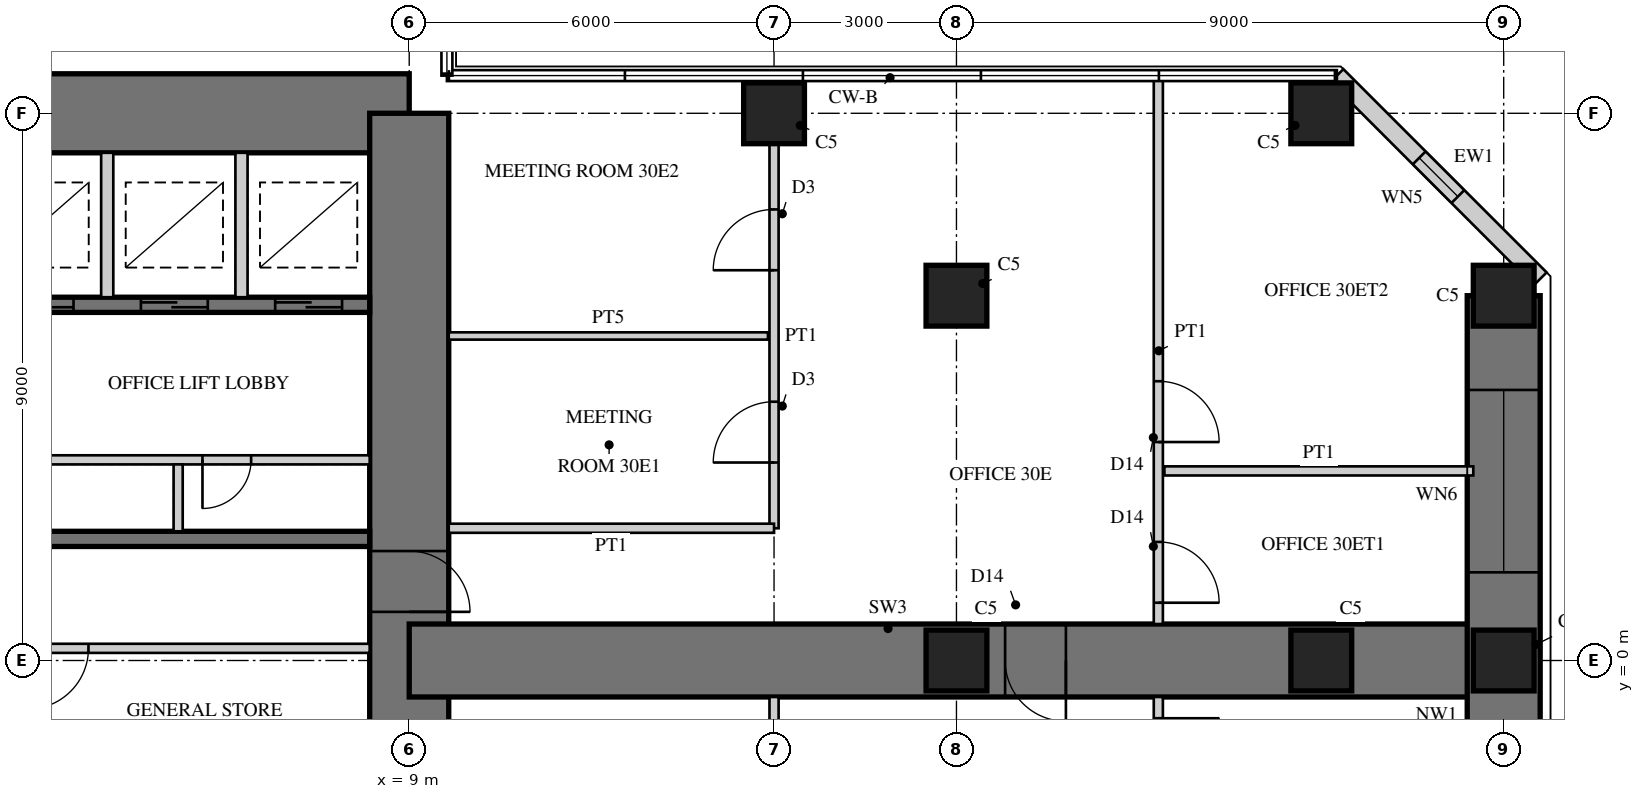
"""IFC4 building model, lengths in metres.
Left out: names, types, materials, properties, quantities, classifications, styles, units other than length and angle.
Written with IfcOpenShell. Run it as: python <this file> out.ifc"""

import sys

from ifc_helpers import new_model, si_unit, direction, frame, frame_2d, origin, origin_2d, place, context, subcontext, project, spatial, rectangle, hollow_rectangle, extrude, element, fill, save


model = new_model("IFC4")
c1 = context("Model", 3, precision=1e-05, world=origin(), true_north=direction((0.0, 1.0)))
c2 = subcontext(c1, "Body", "Model", "MODEL_VIEW")
j1 = project(units=[si_unit("LENGTHUNIT", "METRE"), si_unit("PLANEANGLEUNIT", "RADIAN")], contexts=[c1])
p1 = place(None, origin())
s1 = spatial("IfcSite", under=j1, at=p1, CompositionType="ELEMENT")
p2 = place(p1, origin())
s2 = spatial("IfcBuilding", under=s1, at=p2, CompositionType="ELEMENT")
p3 = place(p2, frame((0.0, 0.0, 124.5)))
s3 = spatial("IfcBuildingStorey", under=s2, at=p3, CompositionType="ELEMENT", Elevation=124.5)
p4 = place(p3, frame((9.0, 9.0, 0.0), z_axis=(0.0, 0.0, 1.0), x_axis=(-1.0, 0.0, 0.0)))
e1 = element("IfcWall", 1, at=p4, inside=s3, PredefinedType="SHEAR", context=c2, shape_type="SweptSolid", body=[
    extrude(rectangle(XDim=18.0, YDim=1.3, at=frame_2d((9.0, 0.0))), origin(), (0.0, 0.0, 1.0), 4.0),
])
p5 = place(p4, frame((9.8, 0.0, 0.0)))
e2 = element("IfcOpeningElement", 2, at=p5, cuts=e1, PredefinedType="OPENING", context=c2, shape_type="SweptSolid", body=[
    extrude(rectangle(XDim=1.0, YDim=2.4, at=frame_2d((0.5, 1.2))), frame((0.0, 0.66, 0.0), z_axis=(0.0, -1.0, 0.0), x_axis=(1.0, 0.0, 0.0)), (0.0, 0.0, 1.0), 1.32),
])
p6 = place(p3, frame((9.0, -9.0, 0.0), z_axis=(0.0, 0.0, 1.0), x_axis=(0.0, 1.0, 0.0)))
e3 = element("IfcWall", 3, at=p6, inside=s3, PredefinedType="SHEAR", context=c2, shape_type="SweptSolid", body=[
    extrude(rectangle(XDim=18.0, YDim=1.3, at=frame_2d((9.0, 0.0))), origin(), (0.0, 0.0, 1.0), 4.0),
])
p7 = place(p6, frame((9.8, 0.0, 0.0)))
e4 = element("IfcOpeningElement", 4, at=p7, cuts=e3, PredefinedType="OPENING", context=c2, shape_type="SweptSolid", body=[
    extrude(rectangle(XDim=1.0, YDim=2.4, at=frame_2d((0.5, 1.2))), frame((0.0, 0.66, 0.0), z_axis=(0.0, -1.0, 0.0), x_axis=(1.0, 0.0, 0.0)), (0.0, 0.0, 1.0), 1.32),
])
p8 = place(p3, frame((1.925, 2.0, 0.0), z_axis=(0.0, 0.0, 1.0), x_axis=(1.0, 0.0, 0.0)))
e5 = element("IfcWall", 5, at=p8, inside=s3, PredefinedType="SHEAR", context=c2, shape_type="SweptSolid", body=[
    extrude(rectangle(XDim=6.425, YDim=0.25, at=frame_2d((3.212, 0.0))), origin(), (0.0, 0.0, 1.0), 4.0),
])
p9 = place(p3, frame((1.925, 5.85, 0.0), z_axis=(0.0, 0.0, 1.0), x_axis=(1.0, 0.0, 0.0)))
e6 = element("IfcWall", 6, at=p9, inside=s3, PredefinedType="SHEAR", context=c2, shape_type="SweptSolid", body=[
    extrude(rectangle(XDim=6.425, YDim=0.25, at=frame_2d((3.212, 0.0))), origin(), (0.0, 0.0, 1.0), 4.0),
])
p10 = place(p9, frame((0.454, 0.0, 0.0)))
e7 = element("IfcOpeningElement", 7, at=p10, cuts=e6, PredefinedType="OPENING", context=c2, shape_type="SweptSolid", body=[
    extrude(rectangle(XDim=1.1, YDim=2.2, at=frame_2d((0.55, 1.1))), frame((0.0, 0.135, 0.0), z_axis=(0.0, -1.0, 0.0), x_axis=(1.0, 0.0, 0.0)), (0.0, 0.0, 1.0), 0.27),
])
p11 = place(p9, frame((2.663, 0.0, 0.0)))
e8 = element("IfcOpeningElement", 8, at=p11, cuts=e6, PredefinedType="OPENING", context=c2, shape_type="SweptSolid", body=[
    extrude(rectangle(XDim=1.1, YDim=2.2, at=frame_2d((0.55, 1.1))), frame((0.0, 0.135, 0.0), z_axis=(0.0, -1.0, 0.0), x_axis=(1.0, 0.0, 0.0)), (0.0, 0.0, 1.0), 0.27),
])
p12 = place(p9, frame((4.871, 0.0, 0.0)))
e9 = element("IfcOpeningElement", 9, at=p12, cuts=e6, PredefinedType="OPENING", context=c2, shape_type="SweptSolid", body=[
    extrude(rectangle(XDim=1.1, YDim=2.2, at=frame_2d((0.55, 1.1))), frame((0.0, 0.135, 0.0), z_axis=(0.0, -1.0, 0.0), x_axis=(1.0, 0.0, 0.0)), (0.0, 0.0, 1.0), 0.27),
])
p13 = place(p3, frame((1.925, 3.3, 0.0), z_axis=(0.0, 0.0, 1.0), x_axis=(1.0, 0.0, 0.0)))
e10 = element("IfcWall", 10, at=p13, inside=s3, PredefinedType="PARTITIONING", context=c2, shape_type="SweptSolid", body=[
    extrude(rectangle(XDim=6.425, YDim=0.15, at=frame_2d((3.212, 0.0))), origin(), (0.0, 0.0, 1.0), 4.0),
])
p14 = place(p13, frame((0.075, 0.0, 0.0)))
e11 = element("IfcOpeningElement", 11, at=p14, cuts=e10, PredefinedType="OPENING", context=c2, shape_type="SweptSolid", body=[
    extrude(rectangle(XDim=0.8, YDim=2.1, at=frame_2d((0.4, 1.05))), frame((0.0, 0.085, 0.0), z_axis=(0.0, -1.0, 0.0), x_axis=(1.0, 0.0, 0.0)), (0.0, 0.0, 1.0), 0.17),
])
p15 = place(p13, frame((3.675, 0.0, 0.0)))
e12 = element("IfcOpeningElement", 12, at=p15, cuts=e10, PredefinedType="OPENING", context=c2, shape_type="SweptSolid", body=[
    extrude(rectangle(XDim=0.8, YDim=2.1, at=frame_2d((0.4, 1.05))), frame((0.0, 0.085, 0.0), z_axis=(0.0, -1.0, 0.0), x_axis=(1.0, 0.0, 0.0)), (0.0, 0.0, 1.0), 0.17),
])
p16 = place(p3, frame((5.2, 2.125, 0.0), z_axis=(0.0, 0.0, 1.0), x_axis=(0.0, 1.0, 0.0)))
e13 = element("IfcWall", 13, at=p16, inside=s3, PredefinedType="PARTITIONING", context=c2, shape_type="SweptSolid", body=[
    extrude(rectangle(XDim=1.1, YDim=0.15, at=frame_2d((0.55, 0.0))), origin(), (0.0, 0.0, 1.0), 4.0),
])
for number, where, z_axis, x_axis in (
    (14, (4.033, 5.975, 0.0), (0.0, 0.0, 1.0), (0.0, 1.0, 0.0)),
    (15, (6.242, 5.975, 0.0), (0.0, 0.0, 1.0), (0.0, 1.0, 0.0)),
):
    element("IfcWall", number, at=place(p3, frame(where, z_axis=z_axis, x_axis=x_axis)), inside=s3, PredefinedType="PARTITIONING", context=c2, shape_type="SweptSolid", body=[
        extrude(rectangle(XDim=2.375, YDim=0.2, at=frame_2d((1.188, 0.0))), origin(), (0.0, 0.0, 1.0), 4.0),
    ])
p17 = place(p3, frame((9.0, 0.0, 0.0), z_axis=(0.0, 0.0, 1.0), x_axis=(1.0, 0.0, 0.0)))
e16 = element("IfcWall", 16, at=p17, inside=s3, PredefinedType="SHEAR", context=c2, shape_type="SweptSolid", body=[
    extrude(rectangle(XDim=18.0, YDim=1.2, at=frame_2d((9.0, 0.0))), origin(), (0.0, 0.0, 1.0), 4.0),
])
p18 = place(p17, frame((9.8, 0.0, 0.0)))
e17 = element("IfcOpeningElement", 17, at=p18, cuts=e16, PredefinedType="OPENING", context=c2, shape_type="SweptSolid", body=[
    extrude(rectangle(XDim=1.0, YDim=2.2, at=frame_2d((0.5, 1.1))), frame((0.0, 0.61, 0.0), z_axis=(0.0, -1.0, 0.0), x_axis=(1.0, 0.0, 0.0)), (0.0, 0.0, 1.0), 1.22),
])
p19 = place(p3, frame((27.0, -6.0, 0.0), z_axis=(0.0, 0.0, 1.0), x_axis=(0.0, 1.0, 0.0)))
e18 = element("IfcWall", 18, at=p19, inside=s3, PredefinedType="SHEAR", context=c2, shape_type="SweptSolid", body=[
    extrude(rectangle(XDim=12.0, YDim=1.2, at=frame_2d((6.0, 0.0))), origin(), (0.0, 0.0, 1.0), 4.0),
])
p20 = place(p19, frame((1.55, 0.0, 0.6)))
e19 = element("IfcOpeningElement", 19, at=p20, cuts=e18, PredefinedType="OPENING", context=c2, shape_type="SweptSolid", body=[
    extrude(rectangle(XDim=3.0, YDim=2.4, at=frame_2d((1.5, 1.2))), frame((0.0, 0.61, 0.0), z_axis=(0.0, -1.0, 0.0), x_axis=(1.0, 0.0, 0.0)), (0.0, 0.0, 1.0), 1.22),
])
p21 = place(p19, frame((7.45, 0.0, 0.6)))
e20 = element("IfcOpeningElement", 20, at=p21, cuts=e18, PredefinedType="OPENING", context=c2, shape_type="SweptSolid", body=[
    extrude(rectangle(XDim=3.0, YDim=2.4, at=frame_2d((1.5, 1.2))), frame((0.0, 0.61, 0.0), z_axis=(0.0, -1.0, 0.0), x_axis=(1.0, 0.0, 0.0)), (0.0, 0.0, 1.0), 1.22),
])
for number, where, z_axis, x_axis in (
    (21, (15.0, 9.0, 0.0), (0.0, 0.0, 1.0), (1.0, 0.0, 0.0)),
    (22, (24.0, 9.0, 0.0), (0.0, 0.0, 1.0), (1.0, 0.0, 0.0)),
    (23, (27.0, 0.0, 0.0), (0.0, 0.0, 1.0), (1.0, 0.0, 0.0)),
    (24, (27.0, 6.0, 0.0), (0.0, 0.0, 1.0), (1.0, 0.0, 0.0)),
    (25, (18.0, 0.0, 0.0), (0.0, 0.0, 1.0), (1.0, 0.0, 0.0)),
    (26, (18.0, 6.0, 0.0), (0.0, 0.0, 1.0), (1.0, 0.0, 0.0)),
    (27, (24.0, 0.0, 0.0), (0.0, 0.0, 1.0), (1.0, 0.0, 0.0)),
):
    element("IfcColumn", number, at=place(p3, frame(where, z_axis=z_axis, x_axis=x_axis)), inside=s3, PredefinedType="COLUMN", context=c2, shape_type="SweptSolid", body=[
        extrude(rectangle(XDim=1.0, YDim=1.0, at=origin_2d()), origin(), (0.0, 0.0, 1.0), 4.0),
    ])
p22 = place(p3, frame((27.6, 6.277, 0.0), z_axis=(0.0, 0.0, 1.0), x_axis=(-0.707106781187, 0.707106781187, 0.0)))
e28 = element("IfcWall", 28, at=p22, inside=s3, PredefinedType="SOLIDWALL", context=c2, shape_type="SweptSolid", body=[
    extrude(rectangle(XDim=4.728, YDim=0.3, at=frame_2d((2.364, 0.0))), origin(), (0.0, 0.0, 1.0), 3.8),
])
p23 = place(p22, frame((1.914, 0.0, 0.3)))
e29 = element("IfcOpeningElement", 29, at=p23, cuts=e28, PredefinedType="OPENING", context=c2, shape_type="SweptSolid", body=[
    extrude(rectangle(XDim=0.9, YDim=2.4, at=frame_2d((0.45, 1.2))), frame((0.0, 0.16, 0.0), z_axis=(0.0, -1.0, 0.0), x_axis=(1.0, 0.0, 0.0)), (0.0, 0.0, 1.0), 0.32),
])
p24 = place(p3, frame((2.325, 0.2, 0.0), z_axis=(0.0, 0.0, 1.0), x_axis=(1.0, 0.0, 0.0)))
e30 = element("IfcWall", 30, at=p24, inside=s3, PredefinedType="PARTITIONING", context=c2, shape_type="SweptSolid", body=[
    extrude(rectangle(XDim=6.025, YDim=0.15, at=frame_2d((3.013, 0.0))), origin(), (0.0, 0.0, 1.0), 3.8),
])
p25 = place(p24, frame((0.4, 0.0, 0.0)))
e31 = element("IfcOpeningElement", 31, at=p25, cuts=e30, PredefinedType="OPENING", context=c2, shape_type="SweptSolid", body=[
    extrude(rectangle(XDim=1.0, YDim=2.1, at=frame_2d((0.5, 1.05))), frame((0.0, 0.085, 0.0), z_axis=(0.0, -1.0, 0.0), x_axis=(1.0, 0.0, 0.0)), (0.0, 0.0, 1.0), 0.17),
])
p26 = place(p3, frame((15.0, 2.175, 0.0), z_axis=(0.0, 0.0, 1.0), x_axis=(0.0, 1.0, 0.0)))
e32 = element("IfcWall", 32, at=p26, inside=s3, PredefinedType="PARTITIONING", context=c2, shape_type="SweptSolid", body=[
    extrude(rectangle(XDim=6.325, YDim=0.15, at=frame_2d((3.163, 0.0))), origin(), (0.0, 0.0, 1.0), 3.0),
])
p27 = place(p26, frame((1.081, 0.0, 0.0)))
e33 = element("IfcOpeningElement", 33, at=p27, cuts=e32, PredefinedType="OPENING", context=c2, shape_type="SweptSolid", body=[
    extrude(rectangle(XDim=1.0, YDim=2.1, at=frame_2d((0.5, 1.05))), frame((0.0, 0.085, 0.0), z_axis=(0.0, -1.0, 0.0), x_axis=(1.0, 0.0, 0.0)), (0.0, 0.0, 1.0), 0.17),
])
p28 = place(p26, frame((4.244, 0.0, 0.0)))
e34 = element("IfcOpeningElement", 34, at=p28, cuts=e32, PredefinedType="OPENING", context=c2, shape_type="SweptSolid", body=[
    extrude(rectangle(XDim=1.0, YDim=2.1, at=frame_2d((0.5, 1.05))), frame((0.0, 0.085, 0.0), z_axis=(0.0, -1.0, 0.0), x_axis=(1.0, 0.0, 0.0)), (0.0, 0.0, 1.0), 0.17),
])
p29 = place(p3, frame((9.65, 2.175, 0.0), z_axis=(0.0, 0.0, 1.0), x_axis=(1.0, 0.0, 0.0)))
e35 = element("IfcWall", 35, at=p29, inside=s3, PredefinedType="PARTITIONING", context=c2, shape_type="SweptSolid", body=[
    extrude(rectangle(XDim=5.35, YDim=0.15, at=frame_2d((2.675, 0.0))), origin(), (0.0, 0.0, 1.0), 3.8),
])
p30 = place(p3, frame((9.65, 5.337, 0.0), z_axis=(0.0, 0.0, 1.0), x_axis=(1.0, 0.0, 0.0)))
e36 = element("IfcWall", 36, at=p30, inside=s3, PredefinedType="PLUMBINGWALL", context=c2, shape_type="SweptSolid", body=[
    extrude(rectangle(XDim=5.25, YDim=0.12, at=frame_2d((2.625, 0.0))), origin(), (0.0, 0.0, 1.0), 3.8),
])
p31 = place(p3, frame((15.0, -8.5, 0.0), z_axis=(0.0, 0.0, 1.0), x_axis=(0.0, 1.0, 0.0)))
e37 = element("IfcWall", 37, at=p31, inside=s3, PredefinedType="PARTITIONING", context=c2, shape_type="SweptSolid", body=[
    extrude(rectangle(XDim=7.9, YDim=0.15, at=frame_2d((3.95, 0.0))), origin(), (0.0, 0.0, 1.0), 3.0),
])
p32 = place(p31, frame((0.8, 0.0, 0.0)))
e38 = element("IfcOpeningElement", 38, at=p32, cuts=e37, PredefinedType="OPENING", context=c2, shape_type="SweptSolid", body=[
    extrude(rectangle(XDim=1.0, YDim=2.1, at=frame_2d((0.5, 1.05))), frame((0.0, 0.085, 0.0), z_axis=(0.0, -1.0, 0.0), x_axis=(1.0, 0.0, 0.0)), (0.0, 0.0, 1.0), 0.17),
])
p33 = place(p31, frame((3.4, 0.0, 0.0)))
e39 = element("IfcOpeningElement", 39, at=p33, cuts=e37, PredefinedType="OPENING", context=c2, shape_type="SweptSolid", body=[
    extrude(rectangle(XDim=1.0, YDim=2.1, at=frame_2d((0.5, 1.05))), frame((0.0, 0.085, 0.0), z_axis=(0.0, -1.0, 0.0), x_axis=(1.0, 0.0, 0.0)), (0.0, 0.0, 1.0), 0.17),
])
p34 = place(p31, frame((6.05, 0.0, 0.0)))
e40 = element("IfcOpeningElement", 40, at=p34, cuts=e37, PredefinedType="OPENING", context=c2, shape_type="SweptSolid", body=[
    extrude(rectangle(XDim=1.0, YDim=2.1, at=frame_2d((0.5, 1.05))), frame((0.0, 0.085, 0.0), z_axis=(0.0, -1.0, 0.0), x_axis=(1.0, 0.0, 0.0)), (0.0, 0.0, 1.0), 0.17),
])
p35 = place(p3, frame((21.42, 3.118, 0.0), z_axis=(0.0, 0.0, 1.0), x_axis=(1.0, 0.0, 0.0)))
e41 = element("IfcWall", 41, at=p35, inside=s3, PredefinedType="PARTITIONING", context=c2, shape_type="SweptSolid", body=[
    extrude(rectangle(XDim=5.08, YDim=0.15, at=frame_2d((2.54, 0.0))), origin(), (0.0, 0.0, 1.0), 3.8),
])
p36 = place(p3, frame((21.32, 0.6, 0.0), z_axis=(0.0, 0.0, 1.0), x_axis=(0.0, 1.0, 0.0)))
e42 = element("IfcWall", 42, at=p36, inside=s3, PredefinedType="PARTITIONING", context=c2, shape_type="SweptSolid", body=[
    extrude(rectangle(XDim=8.98, YDim=0.15, at=frame_2d((4.49, 0.0))), origin(), (0.0, 0.0, 1.0), 3.8),
])
p37 = place(p36, frame((0.35, 0.0, 0.0)))
e43 = element("IfcOpeningElement", 43, at=p37, cuts=e42, PredefinedType="OPENING", context=c2, shape_type="SweptSolid", body=[
    extrude(rectangle(XDim=1.0, YDim=2.2, at=frame_2d((0.5, 1.1))), frame((0.0, 0.085, 0.0), z_axis=(0.0, -1.0, 0.0), x_axis=(1.0, 0.0, 0.0)), (0.0, 0.0, 1.0), 0.17),
])
p38 = place(p36, frame((2.993, 0.0, 0.0)))
e44 = element("IfcOpeningElement", 44, at=p38, cuts=e42, PredefinedType="OPENING", context=c2, shape_type="SweptSolid", body=[
    extrude(rectangle(XDim=1.0, YDim=2.2, at=frame_2d((0.5, 1.1))), frame((0.0, 0.085, 0.0), z_axis=(0.0, -1.0, 0.0), x_axis=(1.0, 0.0, 0.0)), (0.0, 0.0, 1.0), 0.17),
])
p39 = place(p3, frame((21.32, -9.58, 0.0), z_axis=(0.0, 0.0, 1.0), x_axis=(0.0, 1.0, 0.0)))
e45 = element("IfcWall", 45, at=p39, inside=s3, PredefinedType="PARTITIONING", context=c2, shape_type="SweptSolid", body=[
    extrude(rectangle(XDim=8.98, YDim=0.15, at=frame_2d((4.49, 0.0))), origin(), (0.0, 0.0, 1.0), 3.8),
])
p40 = place(p39, frame((4.987, 0.0, 0.0)))
e46 = element("IfcOpeningElement", 46, at=p40, cuts=e45, PredefinedType="OPENING", context=c2, shape_type="SweptSolid", body=[
    extrude(rectangle(XDim=1.0, YDim=2.2, at=frame_2d((0.5, 1.1))), frame((0.0, 0.085, 0.0), z_axis=(0.0, -1.0, 0.0), x_axis=(1.0, 0.0, 0.0)), (0.0, 0.0, 1.0), 0.17),
])
p41 = place(p39, frame((7.63, 0.0, 0.0)))
e47 = element("IfcOpeningElement", 47, at=p41, cuts=e45, PredefinedType="OPENING", context=c2, shape_type="SweptSolid", body=[
    extrude(rectangle(XDim=1.0, YDim=2.2, at=frame_2d((0.5, 1.1))), frame((0.0, 0.085, 0.0), z_axis=(0.0, -1.0, 0.0), x_axis=(1.0, 0.0, 0.0)), (0.0, 0.0, 1.0), 0.17),
])
p42 = place(p21, origin())
e48 = element("IfcWindow", 48, at=p42, inside=s3, PartitioningType="SINGLE_PANEL", PredefinedType="WINDOW", context=c2, shape_type="SweptSolid", body=[
    extrude(hollow_rectangle(XDim=3.0, YDim=2.4, WallThickness=0.06, at=frame_2d((1.5, 1.2))), frame((0.0, 0.03, 0.0), z_axis=(0.0, -1.0, 0.0), x_axis=(1.0, 0.0, 0.0)), (0.0, 0.0, 1.0), 0.06),
    extrude(rectangle(XDim=2.879, YDim=2.279, at=frame_2d((1.5, 1.2))), frame((0.0, 0.03, 0.0), z_axis=(0.0, -1.0, 0.0), x_axis=(1.0, 0.0, 0.0)), (0.0, 0.0, 1.0), 0.06),
])
fill(e20, e48)
p43 = place(p23, origin())
e49 = element("IfcWindow", 49, at=p43, inside=s3, PartitioningType="SINGLE_PANEL", PredefinedType="WINDOW", context=c2, shape_type="SweptSolid", body=[
    extrude(hollow_rectangle(XDim=0.9, YDim=2.4, WallThickness=0.06, at=frame_2d((0.45, 1.2))), frame((0.0, 0.03, 0.0), z_axis=(0.0, -1.0, 0.0), x_axis=(1.0, 0.0, 0.0)), (0.0, 0.0, 1.0), 0.06),
    extrude(rectangle(XDim=0.779, YDim=2.279, at=frame_2d((0.45, 1.2))), frame((0.0, 0.03, 0.0), z_axis=(0.0, -1.0, 0.0), x_axis=(1.0, 0.0, 0.0)), (0.0, 0.0, 1.0), 0.06),
])
fill(e29, e49)
p44 = place(p25, frame((1.0, 0.0, 0.0), z_axis=(0.0, 0.0, 1.0), x_axis=(-1.0, 0.0, 0.0)))
e50 = element("IfcDoor", 50, at=p44, inside=s3, OperationType="SINGLE_SWING_RIGHT", PredefinedType="DOOR", context=c2, shape_type="SweptSolid", body=[
    extrude(rectangle(XDim=1.0, YDim=2.1, at=frame_2d((0.5, 1.05))), frame((0.0, 0.025, 0.0), z_axis=(0.0, -1.0, 0.0), x_axis=(1.0, 0.0, 0.0)), (0.0, 0.0, 1.0), 0.05),
])
fill(e31, e50)
p45 = place(p27, origin())
e51 = element("IfcDoor", 51, at=p45, inside=s3, OperationType="SINGLE_SWING_LEFT", PredefinedType="DOOR", context=c2, shape_type="SweptSolid", body=[
    extrude(rectangle(XDim=1.0, YDim=2.1, at=frame_2d((0.5, 1.05))), frame((0.0, 0.025, 0.0), z_axis=(0.0, -1.0, 0.0), x_axis=(1.0, 0.0, 0.0)), (0.0, 0.0, 1.0), 0.05),
])
fill(e33, e51)
p46 = place(p28, origin())
e52 = element("IfcDoor", 52, at=p46, inside=s3, OperationType="SINGLE_SWING_LEFT", PredefinedType="DOOR", context=c2, shape_type="SweptSolid", body=[
    extrude(rectangle(XDim=1.0, YDim=2.1, at=frame_2d((0.5, 1.05))), frame((0.0, 0.025, 0.0), z_axis=(0.0, -1.0, 0.0), x_axis=(1.0, 0.0, 0.0)), (0.0, 0.0, 1.0), 0.05),
])
fill(e34, e52)
p47 = place(p37, frame((1.0, 0.0, 0.0), z_axis=(0.0, 0.0, 1.0), x_axis=(-1.0, 0.0, 0.0)))
e53 = element("IfcDoor", 53, at=p47, inside=s3, OperationType="SINGLE_SWING_RIGHT", PredefinedType="DOOR", context=c2, shape_type="SweptSolid", body=[
    extrude(rectangle(XDim=1.0, YDim=2.2, at=frame_2d((0.5, 1.1))), frame((0.0, 0.025, 0.0), z_axis=(0.0, -1.0, 0.0), x_axis=(1.0, 0.0, 0.0)), (0.0, 0.0, 1.0), 0.05),
])
fill(e43, e53)
p48 = place(p38, frame((1.0, 0.0, 0.0), z_axis=(0.0, 0.0, 1.0), x_axis=(-1.0, 0.0, 0.0)))
e54 = element("IfcDoor", 54, at=p48, inside=s3, OperationType="SINGLE_SWING_RIGHT", PredefinedType="DOOR", context=c2, shape_type="SweptSolid", body=[
    extrude(rectangle(XDim=1.0, YDim=2.2, at=frame_2d((0.5, 1.1))), frame((0.0, 0.025, 0.0), z_axis=(0.0, -1.0, 0.0), x_axis=(1.0, 0.0, 0.0)), (0.0, 0.0, 1.0), 0.05),
])
fill(e44, e54)
p49 = place(p41, frame((1.0, 0.0, 0.0), z_axis=(0.0, 0.0, 1.0), x_axis=(-1.0, 0.0, 0.0)))
e55 = element("IfcDoor", 55, at=p49, inside=s3, OperationType="SINGLE_SWING_LEFT", PredefinedType="DOOR", context=c2, shape_type="SweptSolid", body=[
    extrude(rectangle(XDim=1.0, YDim=2.2, at=frame_2d((0.5, 1.1))), frame((0.0, 0.025, 0.0), z_axis=(0.0, -1.0, 0.0), x_axis=(1.0, 0.0, 0.0)), (0.0, 0.0, 1.0), 0.05),
])
fill(e47, e55)
p50 = place(p18, frame((1.0, 0.0, 0.0), z_axis=(0.0, 0.0, 1.0), x_axis=(-1.0, 0.0, 0.0)))
e56 = element("IfcDoor", 56, at=p50, inside=s3, OperationType="SINGLE_SWING_LEFT", PredefinedType="DOOR", context=c2, shape_type="SweptSolid", body=[
    extrude(rectangle(XDim=1.0, YDim=2.2, at=frame_2d((0.5, 1.1))), frame((0.0, 0.025, 0.0), z_axis=(0.0, -1.0, 0.0), x_axis=(1.0, 0.0, 0.0)), (0.0, 0.0, 1.0), 0.05),
])
fill(e17, e56)
p51 = place(p7, frame((1.0, 0.0, 0.0), z_axis=(0.0, 0.0, 1.0), x_axis=(-1.0, 0.0, 0.0)))
e57 = element("IfcDoor", 57, at=p51, inside=s3, OperationType="SINGLE_SWING_RIGHT", PredefinedType="DOOR", context=c2, shape_type="SweptSolid", body=[
    extrude(rectangle(XDim=1.0, YDim=2.4, at=frame_2d((0.5, 1.2))), frame((0.0, -0.005, 0.0), z_axis=(0.0, -1.0, 0.0), x_axis=(1.0, 0.0, 0.0)), (0.0, 0.0, 1.0), 0.05),
])
fill(e4, e57)
p52 = place(p10, origin())
e58 = element("IfcDoor", 58, at=p52, inside=s3, OperationType="DOUBLE_DOOR_SLIDING", PredefinedType="DOOR", context=c2, shape_type="SweptSolid", body=[
    extrude(rectangle(XDim=1.1, YDim=2.2, at=frame_2d((0.55, 1.1))), frame((0.0, 0.025, 0.0), z_axis=(0.0, -1.0, 0.0), x_axis=(1.0, 0.0, 0.0)), (0.0, 0.0, 1.0), 0.05),
])
fill(e7, e58)
p53 = place(p11, origin())
e59 = element("IfcDoor", 59, at=p53, inside=s3, OperationType="DOUBLE_DOOR_SLIDING", PredefinedType="DOOR", context=c2, shape_type="SweptSolid", body=[
    extrude(rectangle(XDim=1.1, YDim=2.2, at=frame_2d((0.55, 1.1))), frame((0.0, 0.025, 0.0), z_axis=(0.0, -1.0, 0.0), x_axis=(1.0, 0.0, 0.0)), (0.0, 0.0, 1.0), 0.05),
])
fill(e8, e59)
p54 = place(p12, origin())
e60 = element("IfcDoor", 60, at=p54, inside=s3, OperationType="DOUBLE_DOOR_SLIDING", PredefinedType="DOOR", context=c2, shape_type="SweptSolid", body=[
    extrude(rectangle(XDim=1.1, YDim=2.2, at=frame_2d((0.55, 1.1))), frame((0.0, 0.025, 0.0), z_axis=(0.0, -1.0, 0.0), x_axis=(1.0, 0.0, 0.0)), (0.0, 0.0, 1.0), 0.05),
])
fill(e9, e60)
p55 = place(p15, frame((0.8, 0.0, 0.0), z_axis=(0.0, 0.0, 1.0), x_axis=(-1.0, 0.0, 0.0)))
e61 = element("IfcDoor", 61, at=p55, inside=s3, OperationType="SINGLE_SWING_RIGHT", PredefinedType="DOOR", context=c2, shape_type="SweptSolid", body=[
    extrude(rectangle(XDim=0.8, YDim=2.1, at=frame_2d((0.4, 1.05))), frame((0.0, 0.025, 0.0), z_axis=(0.0, -1.0, 0.0), x_axis=(1.0, 0.0, 0.0)), (0.0, 0.0, 1.0), 0.05),
])
fill(e12, e61)
save(model, sys.argv[1])
